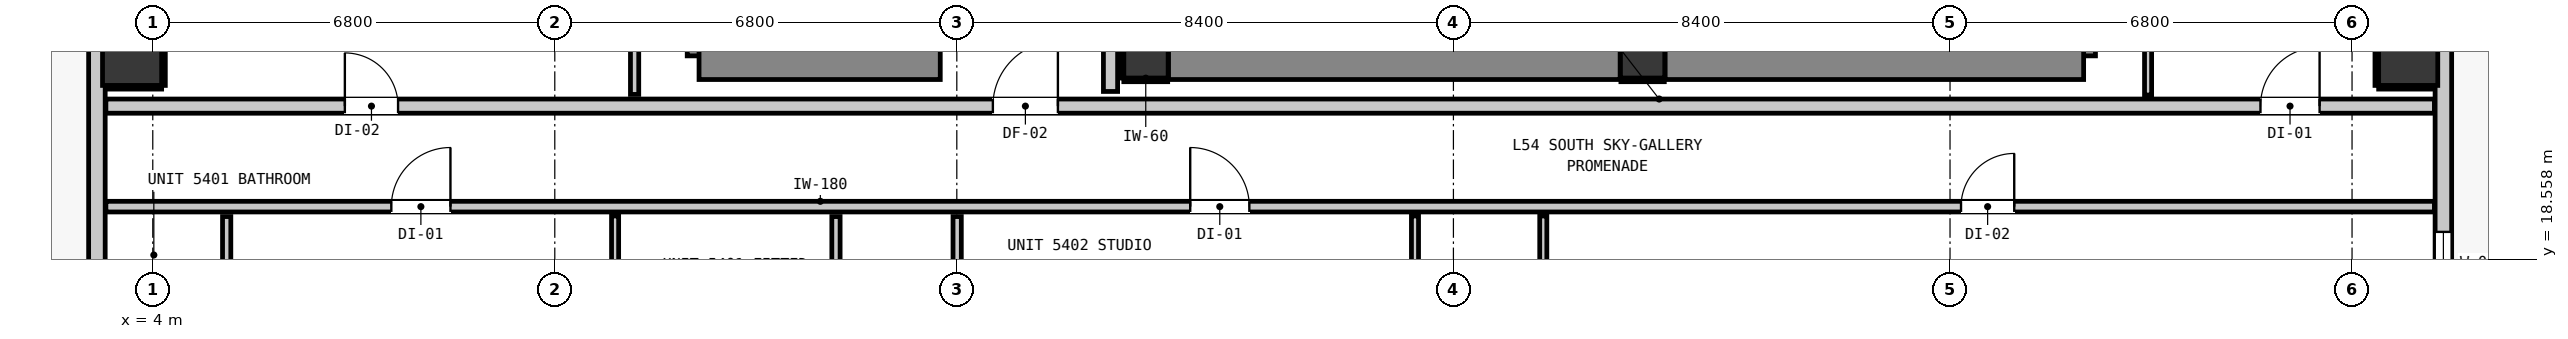
"""IFC4 building model, lengths in metres.
Left out: names, types, materials, properties, quantities, classifications, styles, units other than length and angle.
Written with IfcOpenShell. Run it as: python <this file> out.ifc"""

import sys

from ifc_helpers import new_model, si_unit, direction, frame, frame_2d, origin, origin_2d, place, context, subcontext, project, spatial, rectangle, extrude, element, fill, save


model = new_model("IFC4")
c1 = context("Model", 3, precision=1e-05, world=origin(), true_north=direction((0.0, 1.0)))
c2 = subcontext(c1, "Body", "Model", "MODEL_VIEW")
j1 = project(units=[si_unit("LENGTHUNIT", "METRE"), si_unit("PLANEANGLEUNIT", "RADIAN")], contexts=[c1])
p1 = place(None, origin())
s1 = spatial("IfcSite", under=j1, at=p1, CompositionType="ELEMENT")
p2 = place(p1, origin())
s2 = spatial("IfcBuilding", under=s1, at=p2, CompositionType="ELEMENT")
p3 = place(p2, frame((0.0, 0.0, 186.84)))
s3 = spatial("IfcBuildingStorey", under=s2, at=p3, CompositionType="ELEMENT", Elevation=186.84)
for number, where, z_axis, x_axis in (
    (1, (20.8, 22.0, 0.0), (0.0, 0.0, 1.0), (1.0, 0.0, 0.0)),
    (2, (29.2, 22.0, 0.0), (0.0, 0.0, 1.0), (1.0, 0.0, 0.0)),
):
    element("IfcColumn", number, at=place(p3, frame(where, z_axis=z_axis, x_axis=x_axis)), inside=s3, PredefinedType="COLUMN", context=c2, shape_type="SweptSolid", body=[
        extrude(rectangle(XDim=0.75, YDim=0.75, at=origin_2d()), origin(), (0.0, 0.0, 1.0), 3.32),
    ])
p4 = place(p3, frame((13.44, 22.0, 0.0), z_axis=(0.0, 0.0, 1.0), x_axis=(0.0, 1.0, 0.0)))
e3 = element("IfcWall", 3, at=p4, inside=s3, PredefinedType="SHEAR", context=c2, shape_type="SweptSolid", body=[
    extrude(rectangle(XDim=8.32, YDim=0.8, at=frame_2d((4.16, 0.0))), origin(), (0.0, 0.0, 1.0), 3.32),
])
p5 = place(p3, frame((13.24, 22.0, 0.0), z_axis=(0.0, 0.0, 1.0), x_axis=(1.0, 0.0, 0.0)))
e4 = element("IfcWall", 4, at=p5, inside=s3, PredefinedType="SHEAR", context=c2, shape_type="SweptSolid", body=[
    extrude(rectangle(XDim=4.08, YDim=0.8, at=frame_2d((2.04, 0.0))), origin(), (0.0, 0.0, 1.0), 3.32),
])
p6 = place(p3, frame((36.46, 22.0, 0.0), z_axis=(0.0, 0.0, 1.0), x_axis=(0.0, 1.0, 0.0)))
e5 = element("IfcWall", 5, at=p6, inside=s3, PredefinedType="SHEAR", context=c2, shape_type="SweptSolid", body=[
    extrude(rectangle(XDim=8.32, YDim=0.8, at=frame_2d((4.16, 0.0))), origin(), (0.0, 0.0, 1.0), 3.32),
])
p7 = place(p3, frame((29.58, 22.0, 0.0), z_axis=(0.0, 0.0, 1.0), x_axis=(1.0, 0.0, 0.0)))
e6 = element("IfcWall", 6, at=p7, inside=s3, PredefinedType="SHEAR", context=c2, shape_type="SweptSolid", body=[
    extrude(rectangle(XDim=7.08, YDim=0.8, at=frame_2d((3.54, 0.0))), origin(), (0.0, 0.0, 1.0), 3.32),
])
p8 = place(p3, frame((21.18, 22.0, 0.0), z_axis=(0.0, 0.0, 1.0), x_axis=(1.0, 0.0, 0.0)))
e7 = element("IfcWall", 7, at=p8, inside=s3, PredefinedType="SHEAR", context=c2, shape_type="SweptSolid", body=[
    extrude(rectangle(XDim=7.64, YDim=0.8, at=frame_2d((3.82, 0.0))), origin(), (0.0, 0.0, 1.0), 3.32),
])
for number, where, z_axis, x_axis in (
    (8, (3.65, 22.0, 0.0), (0.0, 0.0, 1.0), (1.0, 0.0, 0.0)),
    (9, (42.15, 22.0, 0.0), (0.0, 0.0, 1.0), (1.0, 0.0, 0.0)),
):
    element("IfcColumn", number, at=place(p3, frame(where, z_axis=z_axis, x_axis=x_axis)), inside=s3, PredefinedType="COLUMN", context=c2, shape_type="SweptSolid", body=[
        extrude(rectangle(XDim=1.0, YDim=1.0, at=origin_2d()), origin(), (0.0, 0.0, 1.0), 2.9),
    ])
p9 = place(p3, frame((3.055, 17.555, 0.0), z_axis=(0.0, 0.0, 1.0), x_axis=(0.0, 1.0, 0.0)))
e10 = element("IfcWall", 10, at=p9, inside=s3, PredefinedType="STANDARD", context=c2, shape_type="SweptSolid", body=[
    extrude(rectangle(XDim=32.29, YDim=0.28, at=frame_2d((16.145, 0.0))), origin(), (0.0, 0.0, 1.0), 2.9),
])
p10 = place(p9, frame((5.467, 0.0, 0.0)))
e11 = element("IfcOpeningElement", 11, at=p10, cuts=e10, PredefinedType="OPENING", context=c2, shape_type="SweptSolid", body=[
    extrude(rectangle(XDim=1.0, YDim=2.15, at=frame_2d((0.5, 1.075))), frame((0.0, 0.15, 0.0), z_axis=(0.0, -1.0, 0.0), x_axis=(1.0, 0.0, 0.0)), (0.0, 0.0, 1.0), 0.3),
])
p11 = place(p9, frame((8.831, 0.0, 0.85)))
e12 = element("IfcOpeningElement", 12, at=p11, cuts=e10, PredefinedType="OPENING", context=c2, shape_type="SweptSolid", body=[
    extrude(rectangle(XDim=1.65, YDim=1.75, at=frame_2d((0.825, 0.875))), frame((0.0, 0.15, 0.0), z_axis=(0.0, -1.0, 0.0), x_axis=(1.0, 0.0, 0.0)), (0.0, 0.0, 1.0), 0.3),
])
p12 = place(p3, frame((42.745, 49.845, 0.0), z_axis=(0.0, 0.0, 1.0), x_axis=(0.0, -1.0, 0.0)))
e13 = element("IfcWall", 13, at=p12, inside=s3, PredefinedType="STANDARD", context=c2, shape_type="SweptSolid", body=[
    extrude(rectangle(XDim=32.29, YDim=0.28, at=frame_2d((16.145, 0.0))), origin(), (0.0, 0.0, 1.0), 2.9),
])
p13 = place(p12, frame((0.904, 0.0, 0.0)))
e14 = element("IfcOpeningElement", 14, at=p13, cuts=e13, PredefinedType="OPENING", context=c2, shape_type="SweptSolid", body=[
    extrude(rectangle(XDim=1.0, YDim=2.15, at=frame_2d((0.5, 1.075))), frame((0.0, 0.15, 0.0), z_axis=(0.0, -1.0, 0.0), x_axis=(1.0, 0.0, 0.0)), (0.0, 0.0, 1.0), 0.3),
])
p14 = place(p12, frame((30.822, 0.0, 0.85)))
e15 = element("IfcOpeningElement", 15, at=p14, cuts=e13, PredefinedType="OPENING", context=c2, shape_type="SweptSolid", body=[
    extrude(rectangle(XDim=1.05, YDim=1.65, at=frame_2d((0.525, 0.825))), frame((0.0, 0.15, 0.0), z_axis=(0.0, -1.0, 0.0), x_axis=(1.0, 0.0, 0.0)), (0.0, 0.0, 1.0), 0.3),
])
p15 = place(p12, frame((4.124, 0.0, 0.85)))
e16 = element("IfcOpeningElement", 16, at=p15, cuts=e13, PredefinedType="OPENING", context=c2, shape_type="SweptSolid", body=[
    extrude(rectangle(XDim=1.65, YDim=1.75, at=frame_2d((0.825, 0.875))), frame((0.0, 0.15, 0.0), z_axis=(0.0, -1.0, 0.0), x_axis=(1.0, 0.0, 0.0)), (0.0, 0.0, 1.0), 0.3),
])
p16 = place(p12, frame((24.424, 0.0, 0.85)))
e17 = element("IfcOpeningElement", 17, at=p16, cuts=e13, PredefinedType="OPENING", context=c2, shape_type="SweptSolid", body=[
    extrude(rectangle(XDim=1.65, YDim=1.75, at=frame_2d((0.825, 0.875))), frame((0.0, 0.15, 0.0), z_axis=(0.0, -1.0, 0.0), x_axis=(1.0, 0.0, 0.0)), (0.0, 0.0, 1.0), 0.3),
])
p17 = place(p3, frame((3.207, 21.15, 0.0), z_axis=(0.0, 0.0, 1.0), x_axis=(1.0, 0.0, 0.0)))
e18 = element("IfcWall", 18, at=p17, inside=s3, PredefinedType="PARTITIONING", context=c2, shape_type="SweptSolid", body=[
    extrude(rectangle(XDim=39.386, YDim=0.24, at=frame_2d((19.693, 0.0))), origin(), (0.0, 0.0, 1.0), 2.9),
])
p18 = place(p17, frame((15.003, 0.0, 0.0)))
e19 = element("IfcOpeningElement", 19, at=p18, cuts=e18, PredefinedType="OPENING", context=c2, shape_type="SweptSolid", body=[
    extrude(rectangle(XDim=1.1, YDim=2.15, at=frame_2d((0.55, 1.075))), frame((0.0, 0.13, 0.0), z_axis=(0.0, -1.0, 0.0), x_axis=(1.0, 0.0, 0.0)), (0.0, 0.0, 1.0), 0.26),
])
p19 = place(p17, frame((4.042, 0.0, 0.0)))
e20 = element("IfcOpeningElement", 20, at=p19, cuts=e18, PredefinedType="OPENING", context=c2, shape_type="SweptSolid", body=[
    extrude(rectangle(XDim=0.9, YDim=2.1, at=frame_2d((0.45, 1.05))), frame((0.0, 0.13, 0.0), z_axis=(0.0, -1.0, 0.0), x_axis=(1.0, 0.0, 0.0)), (0.0, 0.0, 1.0), 0.26),
])
p20 = place(p17, frame((36.444, 0.0, 0.0)))
e21 = element("IfcOpeningElement", 21, at=p20, cuts=e18, PredefinedType="OPENING", context=c2, shape_type="SweptSolid", body=[
    extrude(rectangle(XDim=1.0, YDim=2.15, at=frame_2d((0.5, 1.075))), frame((0.0, 0.13, 0.0), z_axis=(0.0, -1.0, 0.0), x_axis=(1.0, 0.0, 0.0)), (0.0, 0.0, 1.0), 0.26),
])
p21 = place(p3, frame((3.207, 19.45, 0.0), z_axis=(0.0, 0.0, 1.0), x_axis=(1.0, 0.0, 0.0)))
e22 = element("IfcWall", 22, at=p21, inside=s3, PredefinedType="PARTITIONING", context=c2, shape_type="SweptSolid", body=[
    extrude(rectangle(XDim=39.386, YDim=0.18, at=frame_2d((19.693, 0.0))), origin(), (0.0, 0.0, 1.0), 2.9),
])
p22 = place(p21, frame((4.828, 0.0, 0.0)))
e23 = element("IfcOpeningElement", 23, at=p22, cuts=e22, PredefinedType="OPENING", context=c2, shape_type="SweptSolid", body=[
    extrude(rectangle(XDim=1.0, YDim=2.15, at=frame_2d((0.5, 1.075))), frame((0.0, 0.1, 0.0), z_axis=(0.0, -1.0, 0.0), x_axis=(1.0, 0.0, 0.0)), (0.0, 0.0, 1.0), 0.2),
])
p23 = place(p21, frame((18.341, 0.0, 0.0)))
e24 = element("IfcOpeningElement", 24, at=p23, cuts=e22, PredefinedType="OPENING", context=c2, shape_type="SweptSolid", body=[
    extrude(rectangle(XDim=1.0, YDim=2.15, at=frame_2d((0.5, 1.075))), frame((0.0, 0.1, 0.0), z_axis=(0.0, -1.0, 0.0), x_axis=(1.0, 0.0, 0.0)), (0.0, 0.0, 1.0), 0.2),
])
p24 = place(p21, frame((31.379, 0.0, 0.0)))
e25 = element("IfcOpeningElement", 25, at=p24, cuts=e22, PredefinedType="OPENING", context=c2, shape_type="SweptSolid", body=[
    extrude(rectangle(XDim=0.9, YDim=2.1, at=frame_2d((0.45, 1.05))), frame((0.0, 0.1, 0.0), z_axis=(0.0, -1.0, 0.0), x_axis=(1.0, 0.0, 0.0)), (0.0, 0.0, 1.0), 0.2),
])
p25 = place(p3, frame((20.2, 21.398, 0.0), z_axis=(0.0, 0.0, 1.0), x_axis=(0.0, 1.0, 0.0)))
e26 = element("IfcWall", 26, at=p25, inside=s3, PredefinedType="PARTITIONING", context=c2, shape_type="SweptSolid", body=[
    extrude(rectangle(XDim=6.754, YDim=0.24, at=frame_2d((3.377, 0.0))), origin(), (0.0, 0.0, 1.0), 0.905),
])
p26 = place(p3, frame((5.25, 15.575, 0.0), z_axis=(0.0, 0.0, 1.0), x_axis=(0.0, 1.0, 0.0)))
e27 = element("IfcWall", 27, at=p26, inside=s3, PredefinedType="PARTITIONING", context=c2, shape_type="SweptSolid", body=[
    extrude(rectangle(XDim=3.707, YDim=0.14, at=frame_2d((1.854, 0.0))), origin(), (0.0, 0.0, 1.0), 2.9),
])
p27 = place(p26, frame((1.42, 0.0, 0.0)))
e28 = element("IfcOpeningElement", 28, at=p27, cuts=e27, PredefinedType="OPENING", context=c2, shape_type="SweptSolid", body=[
    extrude(rectangle(XDim=0.86, YDim=2.02, at=frame_2d((0.43, 1.01))), frame((0.0, 0.08, 0.0), z_axis=(0.0, -1.0, 0.0), x_axis=(1.0, 0.0, 0.0)), (0.0, 0.0, 1.0), 0.16),
])
p28 = place(p3, frame((12.15, 21.348, 0.0), z_axis=(0.0, 0.0, 1.0), x_axis=(0.0, 1.0, 0.0)))
e29 = element("IfcWall", 29, at=p28, inside=s3, PredefinedType="PARTITIONING", context=c2, shape_type="SweptSolid", body=[
    extrude(rectangle(XDim=13.004, YDim=0.14, at=frame_2d((6.502, 0.0))), origin(), (0.0, 0.0, 1.0), 2.9),
])
p29 = place(p3, frame((15.556, 15.407, 0.0), z_axis=(0.0, 0.0, 1.0), x_axis=(0.0, 1.0, 0.0)))
e30 = element("IfcWall", 30, at=p29, inside=s3, PredefinedType="PARTITIONING", context=c2, shape_type="SweptSolid", body=[
    extrude(rectangle(XDim=3.875, YDim=0.14, at=frame_2d((1.938, 0.0))), origin(), (0.0, 0.0, 1.0), 2.9),
])
p30 = place(p3, frame((17.606, 15.407, 0.0), z_axis=(0.0, 0.0, 1.0), x_axis=(0.0, 1.0, 0.0)))
e31 = element("IfcWall", 31, at=p30, inside=s3, PredefinedType="PARTITIONING", context=c2, shape_type="SweptSolid", body=[
    extrude(rectangle(XDim=3.875, YDim=0.14, at=frame_2d((1.938, 0.0))), origin(), (0.0, 0.0, 1.0), 2.9),
])
p31 = place(p30, frame((1.588, 0.0, 0.0)))
e32 = element("IfcOpeningElement", 32, at=p31, cuts=e31, PredefinedType="OPENING", context=c2, shape_type="SweptSolid", body=[
    extrude(rectangle(XDim=0.86, YDim=2.02, at=frame_2d((0.43, 1.01))), frame((0.0, 0.08, 0.0), z_axis=(0.0, -1.0, 0.0), x_axis=(1.0, 0.0, 0.0)), (0.0, 0.0, 1.0), 0.16),
])
p32 = place(p3, frame((11.82, 15.407, 0.0), z_axis=(0.0, 0.0, 1.0), x_axis=(0.0, 1.0, 0.0)))
e33 = element("IfcWall", 33, at=p32, inside=s3, PredefinedType="PARTITIONING", context=c2, shape_type="SweptSolid", body=[
    extrude(rectangle(XDim=3.885, YDim=0.12, at=frame_2d((1.942, 0.0))), origin(), (0.0, 0.0, 1.0), 2.9),
])
p33 = place(p32, frame((1.568, 0.0, 0.0)))
e34 = element("IfcOpeningElement", 34, at=p33, cuts=e33, PredefinedType="OPENING", context=c2, shape_type="SweptSolid", body=[
    extrude(rectangle(XDim=0.9, YDim=2.1, at=frame_2d((0.45, 1.05))), frame((0.0, 0.07, 0.0), z_axis=(0.0, -1.0, 0.0), x_axis=(1.0, 0.0, 0.0)), (0.0, 0.0, 1.0), 0.14),
])
p34 = place(p3, frame((25.35, 15.407, 0.0), z_axis=(0.0, 0.0, 1.0), x_axis=(0.0, 1.0, 0.0)))
e35 = element("IfcWall", 35, at=p34, inside=s3, PredefinedType="PARTITIONING", context=c2, shape_type="SweptSolid", body=[
    extrude(rectangle(XDim=3.885, YDim=0.12, at=frame_2d((1.942, 0.0))), origin(), (0.0, 0.0, 1.0), 2.9),
])
p35 = place(p34, frame((1.568, 0.0, 0.0)))
e36 = element("IfcOpeningElement", 36, at=p35, cuts=e35, PredefinedType="OPENING", context=c2, shape_type="SweptSolid", body=[
    extrude(rectangle(XDim=0.9, YDim=2.1, at=frame_2d((0.45, 1.05))), frame((0.0, 0.07, 0.0), z_axis=(0.0, -1.0, 0.0), x_axis=(1.0, 0.0, 0.0)), (0.0, 0.0, 1.0), 0.14),
])
p36 = place(p3, frame((27.52, 15.407, 0.0), z_axis=(0.0, 0.0, 1.0), x_axis=(0.0, 1.0, 0.0)))
e37 = element("IfcWall", 37, at=p36, inside=s3, PredefinedType="PARTITIONING", context=c2, shape_type="SweptSolid", body=[
    extrude(rectangle(XDim=3.885, YDim=0.12, at=frame_2d((1.942, 0.0))), origin(), (0.0, 0.0, 1.0), 2.9),
])
p37 = place(p3, frame((37.75, 21.338, 0.0), z_axis=(0.0, 0.0, 1.0), x_axis=(0.0, 1.0, 0.0)))
e38 = element("IfcWall", 38, at=p37, inside=s3, PredefinedType="PARTITIONING", context=c2, shape_type="SweptSolid", body=[
    extrude(rectangle(XDim=5.316, YDim=0.12, at=frame_2d((2.658, 0.0))), origin(), (0.0, 0.0, 1.0), 2.9),
])
p38 = place(p3, frame((20.425, 21.593, 0.0), z_axis=(0.0, 0.0, 1.0), x_axis=(1.0, 0.0, 0.0)))
e39 = element("IfcWall", 39, at=p38, inside=s3, PredefinedType="PARTITIONING", context=c2, shape_type="SweptSolid", body=[
    extrude(rectangle(XDim=0.742, YDim=0.06, at=frame_2d((0.371, 0.0))), origin(), (0.0, 0.0, 1.0), 0.905),
])
p39 = place(p3, frame((20.393, 21.625, 0.0), z_axis=(0.0, 0.0, 1.0), x_axis=(0.0, 1.0, 0.0)))
e40 = element("IfcWall", 40, at=p39, inside=s3, PredefinedType="PARTITIONING", context=c2, shape_type="SweptSolid", body=[
    extrude(rectangle(XDim=0.75, YDim=0.06, at=frame_2d((0.375, 0.0))), origin(), (0.0, 0.0, 1.0), 0.905),
])
p40 = place(p3, frame((28.833, 21.593, 0.0), z_axis=(0.0, 0.0, 1.0), x_axis=(1.0, 0.0, 0.0)))
e41 = element("IfcWall", 41, at=p40, inside=s3, PredefinedType="PARTITIONING", context=c2, shape_type="SweptSolid", body=[
    extrude(rectangle(XDim=0.734, YDim=0.06, at=frame_2d((0.367, 0.0))), origin(), (0.0, 0.0, 1.0), 0.905),
])
p41 = place(p3, frame((3.21, 21.468, 0.0), z_axis=(0.0, 0.0, 1.0), x_axis=(1.0, 0.0, 0.0)))
e42 = element("IfcWall", 42, at=p41, inside=s3, PredefinedType="PARTITIONING", context=c2, shape_type="SweptSolid", body=[
    extrude(rectangle(XDim=0.94, YDim=0.06, at=frame_2d((0.47, 0.0))), origin(), (0.0, 0.0, 1.0), 0.905),
])
p42 = place(p3, frame((4.182, 21.5, 0.0), z_axis=(0.0, 0.0, 1.0), x_axis=(0.0, 1.0, 0.0)))
e43 = element("IfcWall", 43, at=p42, inside=s3, PredefinedType="PARTITIONING", context=c2, shape_type="SweptSolid", body=[
    extrude(rectangle(XDim=1.0, YDim=0.06, at=frame_2d((0.5, 0.0))), origin(), (0.0, 0.0, 1.0), 1.45),
])
p43 = place(p3, frame((41.65, 21.468, 0.0), z_axis=(0.0, 0.0, 1.0), x_axis=(1.0, 0.0, 0.0)))
e44 = element("IfcWall", 44, at=p43, inside=s3, PredefinedType="PARTITIONING", context=c2, shape_type="SweptSolid", body=[
    extrude(rectangle(XDim=0.94, YDim=0.06, at=frame_2d((0.47, 0.0))), origin(), (0.0, 0.0, 1.0), 0.905),
])
p44 = place(p3, frame((41.618, 21.5, 0.0), z_axis=(0.0, 0.0, 1.0), x_axis=(0.0, 1.0, 0.0)))
e45 = element("IfcWall", 45, at=p44, inside=s3, PredefinedType="PARTITIONING", context=c2, shape_type="SweptSolid", body=[
    extrude(rectangle(XDim=1.0, YDim=0.06, at=frame_2d((0.5, 0.0))), origin(), (0.0, 0.0, 1.0), 1.45),
])
p45 = place(p14, origin())
e46 = element("IfcWindow", 46, at=p45, inside=s3, PartitioningType="SINGLE_PANEL", PredefinedType="WINDOW", context=c2, shape_type="SweptSolid", body=[
    extrude(rectangle(XDim=1.05, YDim=1.65, at=frame_2d((0.525, 0.825))), frame((0.0, 0.03, 0.0), z_axis=(0.0, -1.0, 0.0), x_axis=(1.0, 0.0, 0.0)), (0.0, 0.0, 1.0), 0.06),
])
fill(e15, e46)
p46 = place(p18, origin())
e47 = element("IfcDoor", 47, at=p46, inside=s3, OperationType="SINGLE_SWING_RIGHT", PredefinedType="DOOR", context=c2, shape_type="SweptSolid", body=[
    extrude(rectangle(XDim=1.1, YDim=2.15, at=frame_2d((0.55, 1.075))), frame((0.0, 0.025, 0.0), z_axis=(0.0, -1.0, 0.0), x_axis=(1.0, 0.0, 0.0)), (0.0, 0.0, 1.0), 0.05),
])
fill(e19, e47)
p47 = place(p22, origin())
e48 = element("IfcDoor", 48, at=p47, inside=s3, OperationType="SINGLE_SWING_RIGHT", PredefinedType="DOOR", context=c2, shape_type="SweptSolid", body=[
    extrude(rectangle(XDim=1.0, YDim=2.15, at=frame_2d((0.5, 1.075))), frame((0.0, 0.025, 0.0), z_axis=(0.0, -1.0, 0.0), x_axis=(1.0, 0.0, 0.0)), (0.0, 0.0, 1.0), 0.05),
])
fill(e23, e48)
p48 = place(p23, origin())
e49 = element("IfcDoor", 49, at=p48, inside=s3, OperationType="SINGLE_SWING_LEFT", PredefinedType="DOOR", context=c2, shape_type="SweptSolid", body=[
    extrude(rectangle(XDim=1.0, YDim=2.15, at=frame_2d((0.5, 1.075))), frame((0.0, 0.025, 0.0), z_axis=(0.0, -1.0, 0.0), x_axis=(1.0, 0.0, 0.0)), (0.0, 0.0, 1.0), 0.05),
])
fill(e24, e49)
p49 = place(p24, origin())
e50 = element("IfcDoor", 50, at=p49, inside=s3, OperationType="SINGLE_SWING_RIGHT", PredefinedType="DOOR", context=c2, shape_type="SweptSolid", body=[
    extrude(rectangle(XDim=0.9, YDim=2.1, at=frame_2d((0.45, 1.05))), frame((0.0, 0.025, 0.0), z_axis=(0.0, -1.0, 0.0), x_axis=(1.0, 0.0, 0.0)), (0.0, 0.0, 1.0), 0.05),
])
fill(e25, e50)
p50 = place(p19, origin())
e51 = element("IfcDoor", 51, at=p50, inside=s3, OperationType="SINGLE_SWING_LEFT", PredefinedType="DOOR", context=c2, shape_type="SweptSolid", body=[
    extrude(rectangle(XDim=0.9, YDim=2.1, at=frame_2d((0.45, 1.05))), frame((0.0, 0.025, 0.0), z_axis=(0.0, -1.0, 0.0), x_axis=(1.0, 0.0, 0.0)), (0.0, 0.0, 1.0), 0.05),
])
fill(e20, e51)
p51 = place(p20, origin())
e52 = element("IfcDoor", 52, at=p51, inside=s3, OperationType="SINGLE_SWING_RIGHT", PredefinedType="DOOR", context=c2, shape_type="SweptSolid", body=[
    extrude(rectangle(XDim=1.0, YDim=2.15, at=frame_2d((0.5, 1.075))), frame((0.0, 0.025, 0.0), z_axis=(0.0, -1.0, 0.0), x_axis=(1.0, 0.0, 0.0)), (0.0, 0.0, 1.0), 0.05),
])
fill(e21, e52)
save(model, sys.argv[1])
